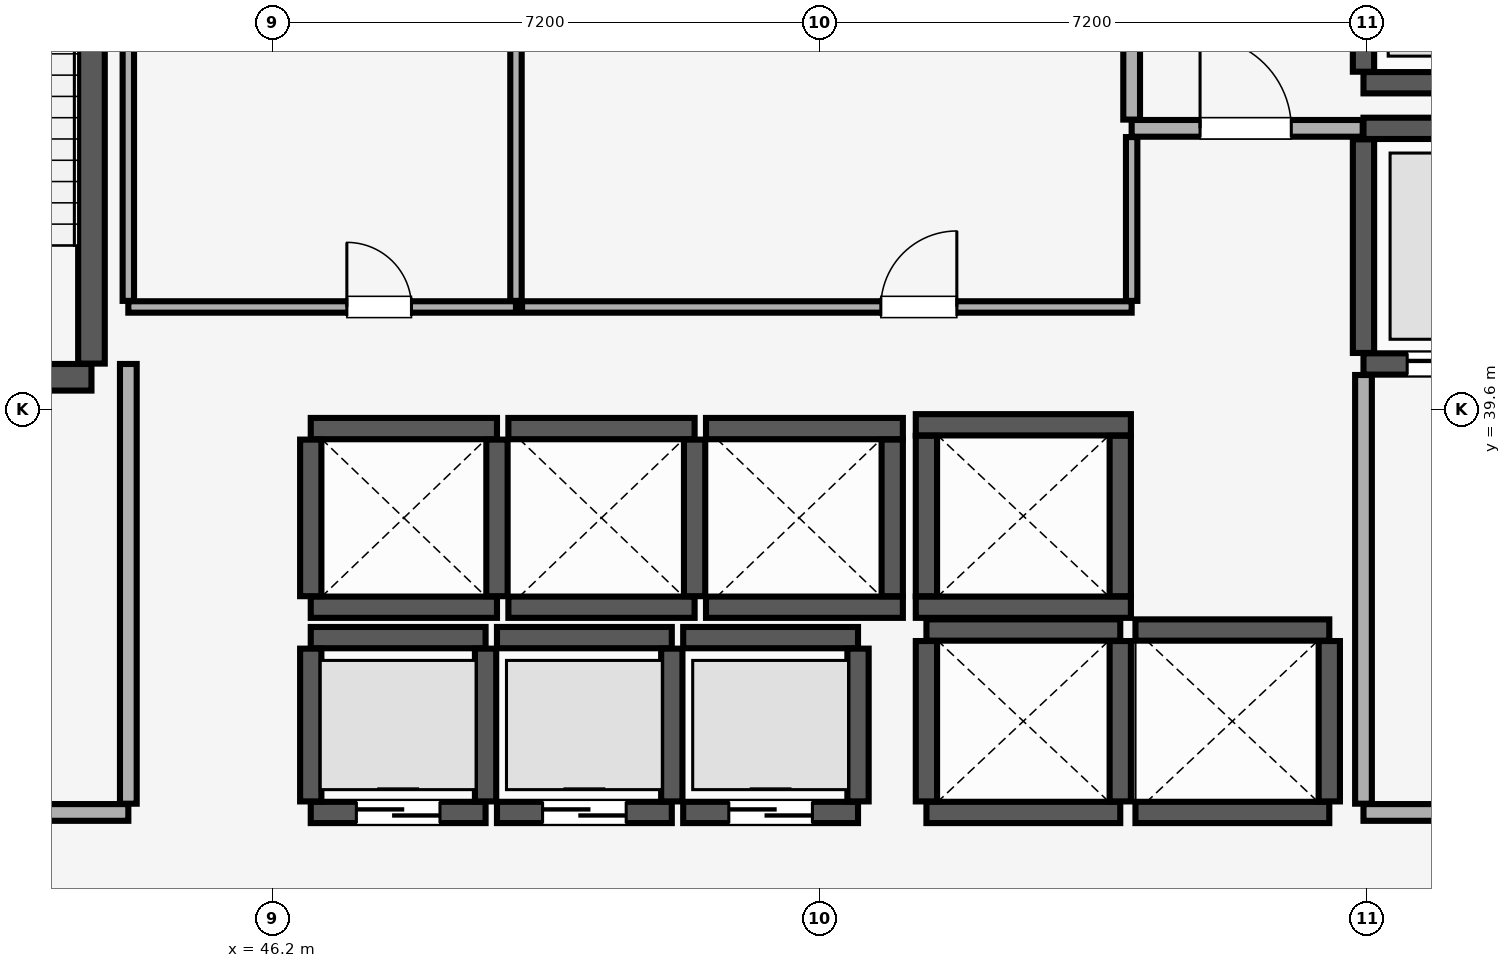
"""IFC4 building model, lengths in metres.
Left out: names, types, materials, properties, quantities, classifications, styles, units other than length and angle.
Written with IfcOpenShell. Run it as: python <this file> out.ifc"""

import sys

from ifc_helpers import new_model, si_unit, direction, frame, frame_2d, origin, place, context, subcontext, project, spatial, rectangle, extrude, element, fill, save


model = new_model("IFC4")
c1 = context("Model", 3, precision=1e-05, world=origin(), true_north=direction((0.0, 1.0)))
c2 = subcontext(c1, "Body", "Model", "MODEL_VIEW")
j1 = project(units=[si_unit("LENGTHUNIT", "METRE"), si_unit("PLANEANGLEUNIT", "RADIAN")], contexts=[c1])
p1 = place(None, origin())
s1 = spatial("IfcSite", under=j1, at=p1, CompositionType="ELEMENT")
p2 = place(p1, origin())
s2 = spatial("IfcBuilding", under=s1, at=p2, CompositionType="ELEMENT")
p3 = place(p2, frame((0.0, 0.0, 180.95)))
s3 = spatial("IfcBuildingStorey", under=s2, at=p3, CompositionType="ELEMENT", Elevation=180.95)
p4 = place(p3, frame((40.185, 40.025, 0.0), z_axis=(0.0, 0.0, 1.0), x_axis=(1.0, 0.0, 0.0)))
e1 = element("IfcWall", 1, at=p4, inside=s3, PredefinedType="SHEAR", context=c2, shape_type="SweptSolid", body=[
    extrude(rectangle(XDim=3.63, YDim=0.35, at=frame_2d((1.815, 0.0))), origin(), (0.0, 0.0, 1.0), 3.45),
])
p5 = place(p4, frame((1.24, 0.0, 0.0)))
e2 = element("IfcOpeningElement", 2, at=p5, cuts=e1, PredefinedType="OPENING", context=c2, shape_type="SweptSolid", body=[
    extrude(rectangle(XDim=1.15, YDim=2.15, at=frame_2d((0.575, 1.075))), frame((0.0, 0.185, 0.0), z_axis=(0.0, -1.0, 0.0), x_axis=(1.0, 0.0, 0.0)), (0.0, 0.0, 1.0), 0.37),
])
p6 = place(p3, frame((43.815, 40.205, 0.0), z_axis=(0.0, 0.0, 1.0), x_axis=(0.0, 1.0, 0.0)))
e3 = element("IfcWall", 3, at=p6, inside=s3, PredefinedType="SHEAR", context=c2, shape_type="SweptSolid", body=[
    extrude(rectangle(XDim=8.09, YDim=0.35, at=frame_2d((4.045, 0.0))), origin(), (0.0, 0.0, 1.0), 3.45),
])
p7 = place(p3, frame((46.7, 34.3, 0.0), z_axis=(0.0, 0.0, 1.0), x_axis=(1.0, 0.0, 0.0)))
e4 = element("IfcWall", 4, at=p7, inside=s3, PredefinedType="SHEAR", context=c2, shape_type="SweptSolid", body=[
    extrude(rectangle(XDim=2.3, YDim=0.28, at=frame_2d((1.15, 0.0))), origin(), (0.0, 0.0, 1.0), 3.45),
])
p8 = place(p7, frame((0.6, 0.0, 0.0)))
e5 = element("IfcOpeningElement", 5, at=p8, cuts=e4, PredefinedType="OPENING", context=c2, shape_type="SweptSolid", body=[
    extrude(rectangle(XDim=1.1, YDim=2.2, at=frame_2d((0.55, 1.1))), frame((0.0, 0.15, 0.0), z_axis=(0.0, -1.0, 0.0), x_axis=(1.0, 0.0, 0.0)), (0.0, 0.0, 1.0), 0.3),
])
p9 = place(p3, frame((46.7, 36.6, 0.0), z_axis=(0.0, 0.0, 1.0), x_axis=(1.0, 0.0, 0.0)))
e6 = element("IfcWall", 6, at=p9, inside=s3, PredefinedType="SHEAR", context=c2, shape_type="SweptSolid", body=[
    extrude(rectangle(XDim=2.3, YDim=0.28, at=frame_2d((1.15, 0.0))), origin(), (0.0, 0.0, 1.0), 3.45),
])
for number, where, z_axis, x_axis in (
    (7, (46.7, 34.445, 0.0), (0.0, 0.0, 1.0), (0.0, 1.0, 0.0)),
    (8, (49.0, 34.445, 0.0), (0.0, 0.0, 1.0), (0.0, 1.0, 0.0)),
):
    element("IfcWall", number, at=place(p3, frame(where, z_axis=z_axis, x_axis=x_axis)), inside=s3, PredefinedType="SHEAR", context=c2, shape_type="SweptSolid", body=[
        extrude(rectangle(XDim=2.01, YDim=0.28, at=frame_2d((1.005, 0.0))), origin(), (0.0, 0.0, 1.0), 3.45),
    ])
p10 = place(p3, frame((49.15, 34.3, 0.0), z_axis=(0.0, 0.0, 1.0), x_axis=(1.0, 0.0, 0.0)))
e9 = element("IfcWall", 9, at=p10, inside=s3, PredefinedType="SHEAR", context=c2, shape_type="SweptSolid", body=[
    extrude(rectangle(XDim=2.3, YDim=0.28, at=frame_2d((1.15, 0.0))), origin(), (0.0, 0.0, 1.0), 3.45),
])
p11 = place(p10, frame((0.6, 0.0, 0.0)))
e10 = element("IfcOpeningElement", 10, at=p11, cuts=e9, PredefinedType="OPENING", context=c2, shape_type="SweptSolid", body=[
    extrude(rectangle(XDim=1.1, YDim=2.2, at=frame_2d((0.55, 1.1))), frame((0.0, 0.15, 0.0), z_axis=(0.0, -1.0, 0.0), x_axis=(1.0, 0.0, 0.0)), (0.0, 0.0, 1.0), 0.3),
])
p12 = place(p3, frame((49.15, 36.6, 0.0), z_axis=(0.0, 0.0, 1.0), x_axis=(1.0, 0.0, 0.0)))
e11 = element("IfcWall", 11, at=p12, inside=s3, PredefinedType="SHEAR", context=c2, shape_type="SweptSolid", body=[
    extrude(rectangle(XDim=2.3, YDim=0.28, at=frame_2d((1.15, 0.0))), origin(), (0.0, 0.0, 1.0), 3.45),
])
p13 = place(p3, frame((51.45, 34.445, 0.0), z_axis=(0.0, 0.0, 1.0), x_axis=(0.0, 1.0, 0.0)))
e12 = element("IfcWall", 12, at=p13, inside=s3, PredefinedType="SHEAR", context=c2, shape_type="SweptSolid", body=[
    extrude(rectangle(XDim=2.01, YDim=0.28, at=frame_2d((1.005, 0.0))), origin(), (0.0, 0.0, 1.0), 3.45),
])
p14 = place(p3, frame((51.6, 34.3, 0.0), z_axis=(0.0, 0.0, 1.0), x_axis=(1.0, 0.0, 0.0)))
e13 = element("IfcWall", 13, at=p14, inside=s3, PredefinedType="SHEAR", context=c2, shape_type="SweptSolid", body=[
    extrude(rectangle(XDim=2.3, YDim=0.28, at=frame_2d((1.15, 0.0))), origin(), (0.0, 0.0, 1.0), 3.45),
])
p15 = place(p14, frame((0.6, 0.0, 0.0)))
e14 = element("IfcOpeningElement", 14, at=p15, cuts=e13, PredefinedType="OPENING", context=c2, shape_type="SweptSolid", body=[
    extrude(rectangle(XDim=1.1, YDim=2.2, at=frame_2d((0.55, 1.1))), frame((0.0, 0.15, 0.0), z_axis=(0.0, -1.0, 0.0), x_axis=(1.0, 0.0, 0.0)), (0.0, 0.0, 1.0), 0.3),
])
p16 = place(p3, frame((51.6, 36.6, 0.0), z_axis=(0.0, 0.0, 1.0), x_axis=(1.0, 0.0, 0.0)))
e15 = element("IfcWall", 15, at=p16, inside=s3, PredefinedType="SHEAR", context=c2, shape_type="SweptSolid", body=[
    extrude(rectangle(XDim=2.3, YDim=0.28, at=frame_2d((1.15, 0.0))), origin(), (0.0, 0.0, 1.0), 3.45),
])
p17 = place(p3, frame((53.9, 34.445, 0.0), z_axis=(0.0, 0.0, 1.0), x_axis=(0.0, 1.0, 0.0)))
e16 = element("IfcWall", 16, at=p17, inside=s3, PredefinedType="SHEAR", context=c2, shape_type="SweptSolid", body=[
    extrude(rectangle(XDim=2.01, YDim=0.28, at=frame_2d((1.005, 0.0))), origin(), (0.0, 0.0, 1.0), 3.45),
])
for number, where, z_axis, x_axis in (
    (17, (46.7, 37.0, 0.0), (0.0, 0.0, 1.0), (1.0, 0.0, 0.0)),
    (18, (46.7, 39.35, 0.0), (0.0, 0.0, 1.0), (1.0, 0.0, 0.0)),
):
    element("IfcWall", number, at=place(p3, frame(where, z_axis=z_axis, x_axis=x_axis)), inside=s3, PredefinedType="SHEAR", context=c2, shape_type="SweptSolid", body=[
        extrude(rectangle(XDim=2.45, YDim=0.28, at=frame_2d((1.225, 0.0))), origin(), (0.0, 0.0, 1.0), 3.45),
    ])
for number, where, z_axis, x_axis in (
    (19, (46.7, 37.145, 0.0), (0.0, 0.0, 1.0), (0.0, 1.0, 0.0)),
    (20, (49.15, 37.145, 0.0), (0.0, 0.0, 1.0), (0.0, 1.0, 0.0)),
):
    element("IfcWall", number, at=place(p3, frame(where, z_axis=z_axis, x_axis=x_axis)), inside=s3, PredefinedType="SHEAR", context=c2, shape_type="SweptSolid", body=[
        extrude(rectangle(XDim=2.06, YDim=0.28, at=frame_2d((1.03, 0.0))), origin(), (0.0, 0.0, 1.0), 3.45),
    ])
for number, where, z_axis, x_axis in (
    (21, (49.3, 37.0, 0.0), (0.0, 0.0, 1.0), (1.0, 0.0, 0.0)),
    (22, (49.3, 39.35, 0.0), (0.0, 0.0, 1.0), (1.0, 0.0, 0.0)),
):
    element("IfcWall", number, at=place(p3, frame(where, z_axis=z_axis, x_axis=x_axis)), inside=s3, PredefinedType="SHEAR", context=c2, shape_type="SweptSolid", body=[
        extrude(rectangle(XDim=2.45, YDim=0.28, at=frame_2d((1.225, 0.0))), origin(), (0.0, 0.0, 1.0), 3.45),
    ])
p18 = place(p3, frame((51.75, 37.145, 0.0), z_axis=(0.0, 0.0, 1.0), x_axis=(0.0, 1.0, 0.0)))
e23 = element("IfcWall", 23, at=p18, inside=s3, PredefinedType="SHEAR", context=c2, shape_type="SweptSolid", body=[
    extrude(rectangle(XDim=2.06, YDim=0.28, at=frame_2d((1.03, 0.0))), origin(), (0.0, 0.0, 1.0), 3.45),
])
for number, where, z_axis, x_axis in (
    (24, (51.9, 37.0, 0.0), (0.0, 0.0, 1.0), (1.0, 0.0, 0.0)),
    (25, (51.9, 39.35, 0.0), (0.0, 0.0, 1.0), (1.0, 0.0, 0.0)),
):
    element("IfcWall", number, at=place(p3, frame(where, z_axis=z_axis, x_axis=x_axis)), inside=s3, PredefinedType="SHEAR", context=c2, shape_type="SweptSolid", body=[
        extrude(rectangle(XDim=2.59, YDim=0.28, at=frame_2d((1.295, 0.0))), origin(), (0.0, 0.0, 1.0), 3.45),
    ])
p19 = place(p3, frame((54.35, 37.145, 0.0), z_axis=(0.0, 0.0, 1.0), x_axis=(0.0, 1.0, 0.0)))
e26 = element("IfcWall", 26, at=p19, inside=s3, PredefinedType="SHEAR", context=c2, shape_type="SweptSolid", body=[
    extrude(rectangle(XDim=2.06, YDim=0.28, at=frame_2d((1.03, 0.0))), origin(), (0.0, 0.0, 1.0), 3.45),
])
for number, where, z_axis, x_axis in (
    (27, (54.8, 34.3, 0.0), (0.0, 0.0, 1.0), (1.0, 0.0, 0.0)),
    (28, (54.8, 36.7, 0.0), (0.0, 0.0, 1.0), (1.0, 0.0, 0.0)),
):
    element("IfcWall", number, at=place(p3, frame(where, z_axis=z_axis, x_axis=x_axis)), inside=s3, PredefinedType="SHEAR", context=c2, shape_type="SweptSolid", body=[
        extrude(rectangle(XDim=2.55, YDim=0.28, at=frame_2d((1.275, 0.0))), origin(), (0.0, 0.0, 1.0), 3.45),
    ])
for number, where, z_axis, x_axis in (
    (29, (54.8, 34.445, 0.0), (0.0, 0.0, 1.0), (0.0, 1.0, 0.0)),
    (30, (57.35, 34.445, 0.0), (0.0, 0.0, 1.0), (0.0, 1.0, 0.0)),
):
    element("IfcWall", number, at=place(p3, frame(where, z_axis=z_axis, x_axis=x_axis)), inside=s3, PredefinedType="SHEAR", context=c2, shape_type="SweptSolid", body=[
        extrude(rectangle(XDim=2.11, YDim=0.28, at=frame_2d((1.055, 0.0))), origin(), (0.0, 0.0, 1.0), 3.45),
    ])
for number, where, z_axis, x_axis in (
    (31, (57.55, 34.3, 0.0), (0.0, 0.0, 1.0), (1.0, 0.0, 0.0)),
    (32, (57.55, 36.7, 0.0), (0.0, 0.0, 1.0), (1.0, 0.0, 0.0)),
):
    element("IfcWall", number, at=place(p3, frame(where, z_axis=z_axis, x_axis=x_axis)), inside=s3, PredefinedType="SHEAR", context=c2, shape_type="SweptSolid", body=[
        extrude(rectangle(XDim=2.55, YDim=0.28, at=frame_2d((1.275, 0.0))), origin(), (0.0, 0.0, 1.0), 3.45),
    ])
p20 = place(p3, frame((60.1, 34.445, 0.0), z_axis=(0.0, 0.0, 1.0), x_axis=(0.0, 1.0, 0.0)))
e33 = element("IfcWall", 33, at=p20, inside=s3, PredefinedType="SHEAR", context=c2, shape_type="SweptSolid", body=[
    extrude(rectangle(XDim=2.11, YDim=0.28, at=frame_2d((1.055, 0.0))), origin(), (0.0, 0.0, 1.0), 3.45),
])
for number, where, z_axis, x_axis in (
    (34, (54.66, 37.0, 0.0), (0.0, 0.0, 1.0), (1.0, 0.0, 0.0)),
    (35, (54.66, 39.4, 0.0), (0.0, 0.0, 1.0), (1.0, 0.0, 0.0)),
):
    element("IfcWall", number, at=place(p3, frame(where, z_axis=z_axis, x_axis=x_axis)), inside=s3, PredefinedType="SHEAR", context=c2, shape_type="SweptSolid", body=[
        extrude(rectangle(XDim=2.83, YDim=0.28, at=frame_2d((1.415, 0.0))), origin(), (0.0, 0.0, 1.0), 3.45),
    ])
for number, where, z_axis, x_axis in (
    (36, (54.8, 37.145, 0.0), (0.0, 0.0, 1.0), (0.0, 1.0, 0.0)),
    (37, (57.35, 37.145, 0.0), (0.0, 0.0, 1.0), (0.0, 1.0, 0.0)),
):
    element("IfcWall", number, at=place(p3, frame(where, z_axis=z_axis, x_axis=x_axis)), inside=s3, PredefinedType="SHEAR", context=c2, shape_type="SweptSolid", body=[
        extrude(rectangle(XDim=2.11, YDim=0.28, at=frame_2d((1.055, 0.0))), origin(), (0.0, 0.0, 1.0), 3.45),
    ])
p21 = place(p3, frame((60.55, 40.2, 0.0), z_axis=(0.0, 0.0, 1.0), x_axis=(1.0, 0.0, 0.0)))
e38 = element("IfcWall", 38, at=p21, inside=s3, PredefinedType="SHEAR", context=c2, shape_type="SweptSolid", body=[
    extrude(rectangle(XDim=2.415, YDim=0.28, at=frame_2d((1.208, 0.0))), origin(), (0.0, 0.0, 1.0), 3.45),
])
p22 = place(p21, frame((0.575, 0.0, 0.0)))
e39 = element("IfcOpeningElement", 39, at=p22, cuts=e38, PredefinedType="OPENING", context=c2, shape_type="SweptSolid", body=[
    extrude(rectangle(XDim=1.3, YDim=2.3, at=frame_2d((0.65, 1.15))), frame((0.0, 0.15, 0.0), z_axis=(0.0, -1.0, 0.0), x_axis=(1.0, 0.0, 0.0)), (0.0, 0.0, 1.0), 0.3),
])
p23 = place(p3, frame((60.55, 43.3, 0.0), z_axis=(0.0, 0.0, 1.0), x_axis=(1.0, 0.0, 0.0)))
e40 = element("IfcWall", 40, at=p23, inside=s3, PredefinedType="SHEAR", context=c2, shape_type="SweptSolid", body=[
    extrude(rectangle(XDim=2.415, YDim=0.28, at=frame_2d((1.208, 0.0))), origin(), (0.0, 0.0, 1.0), 3.45),
])
p24 = place(p3, frame((60.55, 40.345, 0.0), z_axis=(0.0, 0.0, 1.0), x_axis=(0.0, 1.0, 0.0)))
e41 = element("IfcWall", 41, at=p24, inside=s3, PredefinedType="SHEAR", context=c2, shape_type="SweptSolid", body=[
    extrude(rectangle(XDim=2.81, YDim=0.28, at=frame_2d((1.405, 0.0))), origin(), (0.0, 0.0, 1.0), 3.45),
])
p25 = place(p3, frame((60.55, 43.9, 0.0), z_axis=(0.0, 0.0, 1.0), x_axis=(1.0, 0.0, 0.0)))
e42 = element("IfcWall", 42, at=p25, inside=s3, PredefinedType="SHEAR", context=c2, shape_type="SweptSolid", body=[
    extrude(rectangle(XDim=2.415, YDim=0.28, at=frame_2d((1.208, 0.0))), origin(), (0.0, 0.0, 1.0), 3.45),
])
p26 = place(p3, frame((60.55, 44.045, 0.0), z_axis=(0.0, 0.0, 1.0), x_axis=(0.0, 1.0, 0.0)))
e43 = element("IfcWall", 43, at=p26, inside=s3, PredefinedType="SHEAR", context=c2, shape_type="SweptSolid", body=[
    extrude(rectangle(XDim=3.11, YDim=0.28, at=frame_2d((1.555, 0.0))), origin(), (0.0, 0.0, 1.0), 3.45),
])
p27 = place(p26, frame((0.905, 0.0, 0.0)))
e44 = element("IfcOpeningElement", 44, at=p27, cuts=e43, PredefinedType="OPENING", context=c2, shape_type="SweptSolid", body=[
    extrude(rectangle(XDim=1.3, YDim=2.3, at=frame_2d((0.65, 1.15))), frame((0.0, 0.15, 0.0), z_axis=(0.0, -1.0, 0.0), x_axis=(1.0, 0.0, 0.0)), (0.0, 0.0, 1.0), 0.3),
])
p28 = place(p3, frame((60.55, 34.3, 0.0), z_axis=(0.0, 0.0, 1.0), x_axis=(1.0, 0.0, 0.0)))
e45 = element("IfcWall", 45, at=p28, inside=s3, PredefinedType="PARTITIONING", context=c2, shape_type="SweptSolid", body=[
    extrude(rectangle(XDim=6.05, YDim=0.22, at=frame_2d((3.025, 0.0))), origin(), (0.0, 0.0, 1.0), 3.45),
])
p29 = place(p28, frame((2.65, 0.0, 0.0)))
e46 = element("IfcOpeningElement", 46, at=p29, cuts=e45, PredefinedType="OPENING", context=c2, shape_type="SweptSolid", body=[
    extrude(rectangle(XDim=1.2, YDim=2.15, at=frame_2d((0.6, 1.075))), frame((0.0, 0.12, 0.0), z_axis=(0.0, -1.0, 0.0), x_axis=(1.0, 0.0, 0.0)), (0.0, 0.0, 1.0), 0.24),
])
p30 = place(p3, frame((60.55, 34.415, 0.0), z_axis=(0.0, 0.0, 1.0), x_axis=(0.0, 1.0, 0.0)))
e47 = element("IfcWall", 47, at=p30, inside=s3, PredefinedType="PARTITIONING", context=c2, shape_type="SweptSolid", body=[
    extrude(rectangle(XDim=5.64, YDim=0.22, at=frame_2d((2.82, 0.0))), origin(), (0.0, 0.0, 1.0), 3.45),
])
p31 = place(p3, frame((39.7, 34.3, 0.0), z_axis=(0.0, 0.0, 1.0), x_axis=(1.0, 0.0, 0.0)))
e48 = element("IfcWall", 48, at=p31, inside=s3, PredefinedType="PARTITIONING", context=c2, shape_type="SweptSolid", body=[
    extrude(rectangle(XDim=4.6, YDim=0.22, at=frame_2d((2.3, 0.0))), origin(), (0.0, 0.0, 1.0), 3.45),
])
p32 = place(p31, frame((1.7, 0.0, 0.0)))
e49 = element("IfcOpeningElement", 49, at=p32, cuts=e48, PredefinedType="OPENING", context=c2, shape_type="SweptSolid", body=[
    extrude(rectangle(XDim=1.2, YDim=2.15, at=frame_2d((0.6, 1.075))), frame((0.0, 0.12, 0.0), z_axis=(0.0, -1.0, 0.0), x_axis=(1.0, 0.0, 0.0)), (0.0, 0.0, 1.0), 0.24),
])
p33 = place(p3, frame((44.3, 34.415, 0.0), z_axis=(0.0, 0.0, 1.0), x_axis=(0.0, 1.0, 0.0)))
e50 = element("IfcWall", 50, at=p33, inside=s3, PredefinedType="PARTITIONING", context=c2, shape_type="SweptSolid", body=[
    extrude(rectangle(XDim=5.785, YDim=0.22, at=frame_2d((2.893, 0.0))), origin(), (0.0, 0.0, 1.0), 3.45),
])
p34 = place(p3, frame((57.5, 43.3, 0.0), z_axis=(0.0, 0.0, 1.0), x_axis=(1.0, 0.0, 0.0)))
e51 = element("IfcWall", 51, at=p34, inside=s3, PredefinedType="PARTITIONING", context=c2, shape_type="SweptSolid", body=[
    extrude(rectangle(XDim=3.04, YDim=0.22, at=frame_2d((1.52, 0.0))), origin(), (0.0, 0.0, 1.0), 3.45),
])
p35 = place(p34, frame((0.9, 0.0, 0.0)))
e52 = element("IfcOpeningElement", 52, at=p35, cuts=e51, PredefinedType="OPENING", context=c2, shape_type="SweptSolid", body=[
    extrude(rectangle(XDim=1.2, YDim=2.15, at=frame_2d((0.6, 1.075))), frame((0.0, 0.12, 0.0), z_axis=(0.0, -1.0, 0.0), x_axis=(1.0, 0.0, 0.0)), (0.0, 0.0, 1.0), 0.24),
])
p36 = place(p3, frame((57.5, 43.415, 0.0), z_axis=(0.0, 0.0, 1.0), x_axis=(0.0, 1.0, 0.0)))
e53 = element("IfcWall", 53, at=p36, inside=s3, PredefinedType="PARTITIONING", context=c2, shape_type="SweptSolid", body=[
    extrude(rectangle(XDim=5.435, YDim=0.22, at=frame_2d((2.718, 0.0))), origin(), (0.0, 0.0, 1.0), 3.45),
])
p37 = place(p3, frame((44.3, 40.95, 0.0), z_axis=(0.0, 0.0, 1.0), x_axis=(1.0, 0.0, 0.0)))
e54 = element("IfcWall", 54, at=p37, inside=s3, PredefinedType="PARTITIONING", context=c2, shape_type="SweptSolid", body=[
    extrude(rectangle(XDim=5.1, YDim=0.15, at=frame_2d((2.55, 0.0))), origin(), (0.0, 0.0, 1.0), 3.45),
])
p38 = place(p37, frame((2.875, 0.0, 0.0)))
e55 = element("IfcOpeningElement", 55, at=p38, cuts=e54, PredefinedType="OPENING", context=c2, shape_type="SweptSolid", body=[
    extrude(rectangle(XDim=0.85, YDim=2.1, at=frame_2d((0.425, 1.05))), frame((0.0, 0.085, 0.0), z_axis=(0.0, -1.0, 0.0), x_axis=(1.0, 0.0, 0.0)), (0.0, 0.0, 1.0), 0.17),
])
for number, where, z_axis, x_axis in (
    (56, (44.3, 41.03, 0.0), (0.0, 0.0, 1.0), (0.0, 1.0, 0.0)),
    (57, (49.4, 41.03, 0.0), (0.0, 0.0, 1.0), (0.0, 1.0, 0.0)),
):
    element("IfcWall", number, at=place(p3, frame(where, z_axis=z_axis, x_axis=x_axis)), inside=s3, PredefinedType="PARTITIONING", context=c2, shape_type="SweptSolid", body=[
        extrude(rectangle(XDim=7.82, YDim=0.15, at=frame_2d((3.91, 0.0))), origin(), (0.0, 0.0, 1.0), 3.45),
    ])
p39 = place(p3, frame((49.48, 40.95, 0.0), z_axis=(0.0, 0.0, 1.0), x_axis=(1.0, 0.0, 0.0)))
e58 = element("IfcWall", 58, at=p39, inside=s3, PredefinedType="PARTITIONING", context=c2, shape_type="SweptSolid", body=[
    extrude(rectangle(XDim=8.02, YDim=0.15, at=frame_2d((4.01, 0.0))), origin(), (0.0, 0.0, 1.0), 3.45),
])
p40 = place(p39, frame((4.72, 0.0, 0.0)))
e59 = element("IfcOpeningElement", 59, at=p40, cuts=e58, PredefinedType="OPENING", context=c2, shape_type="SweptSolid", body=[
    extrude(rectangle(XDim=1.0, YDim=2.15, at=frame_2d((0.5, 1.075))), frame((0.0, 0.085, 0.0), z_axis=(0.0, -1.0, 0.0), x_axis=(1.0, 0.0, 0.0)), (0.0, 0.0, 1.0), 0.17),
])
p41 = place(p3, frame((57.5, 41.03, 0.0), z_axis=(0.0, 0.0, 1.0), x_axis=(0.0, 1.0, 0.0)))
e60 = element("IfcWall", 60, at=p41, inside=s3, PredefinedType="PARTITIONING", context=c2, shape_type="SweptSolid", body=[
    extrude(rectangle(XDim=2.155, YDim=0.15, at=frame_2d((1.078, 0.0))), origin(), (0.0, 0.0, 1.0), 3.45),
])
p42 = place(p8, origin())
e61 = element("IfcDoor", 61, at=p42, inside=s3, OperationType="DOUBLE_DOOR_SLIDING", PredefinedType="DOOR", context=c2, shape_type="SweptSolid", body=[
    extrude(rectangle(XDim=1.1, YDim=2.2, at=frame_2d((0.55, 1.1))), frame((0.0, 0.025, 0.0), z_axis=(0.0, -1.0, 0.0), x_axis=(1.0, 0.0, 0.0)), (0.0, 0.0, 1.0), 0.05),
])
fill(e5, e61)
p43 = place(p11, origin())
e62 = element("IfcDoor", 62, at=p43, inside=s3, OperationType="DOUBLE_DOOR_SLIDING", PredefinedType="DOOR", context=c2, shape_type="SweptSolid", body=[
    extrude(rectangle(XDim=1.1, YDim=2.2, at=frame_2d((0.55, 1.1))), frame((0.0, 0.025, 0.0), z_axis=(0.0, -1.0, 0.0), x_axis=(1.0, 0.0, 0.0)), (0.0, 0.0, 1.0), 0.05),
])
fill(e10, e62)
p44 = place(p15, origin())
e63 = element("IfcDoor", 63, at=p44, inside=s3, OperationType="DOUBLE_DOOR_SLIDING", PredefinedType="DOOR", context=c2, shape_type="SweptSolid", body=[
    extrude(rectangle(XDim=1.1, YDim=2.2, at=frame_2d((0.55, 1.1))), frame((0.0, 0.025, 0.0), z_axis=(0.0, -1.0, 0.0), x_axis=(1.0, 0.0, 0.0)), (0.0, 0.0, 1.0), 0.05),
])
fill(e14, e63)
p45 = place(p22, origin())
e64 = element("IfcDoor", 64, at=p45, inside=s3, OperationType="DOUBLE_DOOR_SLIDING", PredefinedType="DOOR", context=c2, shape_type="SweptSolid", body=[
    extrude(rectangle(XDim=1.3, YDim=2.3, at=frame_2d((0.65, 1.15))), frame((0.0, 0.025, 0.0), z_axis=(0.0, -1.0, 0.0), x_axis=(1.0, 0.0, 0.0)), (0.0, 0.0, 1.0), 0.05),
])
fill(e39, e64)
p46 = place(p35, origin())
e65 = element("IfcDoor", 65, at=p46, inside=s3, OperationType="SINGLE_SWING_LEFT", PredefinedType="DOOR", context=c2, shape_type="SweptSolid", body=[
    extrude(rectangle(XDim=1.2, YDim=2.15, at=frame_2d((0.6, 1.075))), frame((0.0, 0.025, 0.0), z_axis=(0.0, -1.0, 0.0), x_axis=(1.0, 0.0, 0.0)), (0.0, 0.0, 1.0), 0.05),
])
fill(e52, e65)
p47 = place(p38, origin())
e66 = element("IfcDoor", 66, at=p47, inside=s3, OperationType="SINGLE_SWING_LEFT", PredefinedType="DOOR", context=c2, shape_type="SweptSolid", body=[
    extrude(rectangle(XDim=0.85, YDim=2.1, at=frame_2d((0.425, 1.05))), frame((0.0, 0.025, 0.0), z_axis=(0.0, -1.0, 0.0), x_axis=(1.0, 0.0, 0.0)), (0.0, 0.0, 1.0), 0.05),
])
fill(e55, e66)
p48 = place(p40, origin())
e67 = element("IfcDoor", 67, at=p48, inside=s3, OperationType="SINGLE_SWING_RIGHT", PredefinedType="DOOR", context=c2, shape_type="SweptSolid", body=[
    extrude(rectangle(XDim=1.0, YDim=2.15, at=frame_2d((0.5, 1.075))), frame((0.0, 0.025, 0.0), z_axis=(0.0, -1.0, 0.0), x_axis=(1.0, 0.0, 0.0)), (0.0, 0.0, 1.0), 0.05),
])
fill(e59, e67)
save(model, sys.argv[1])
